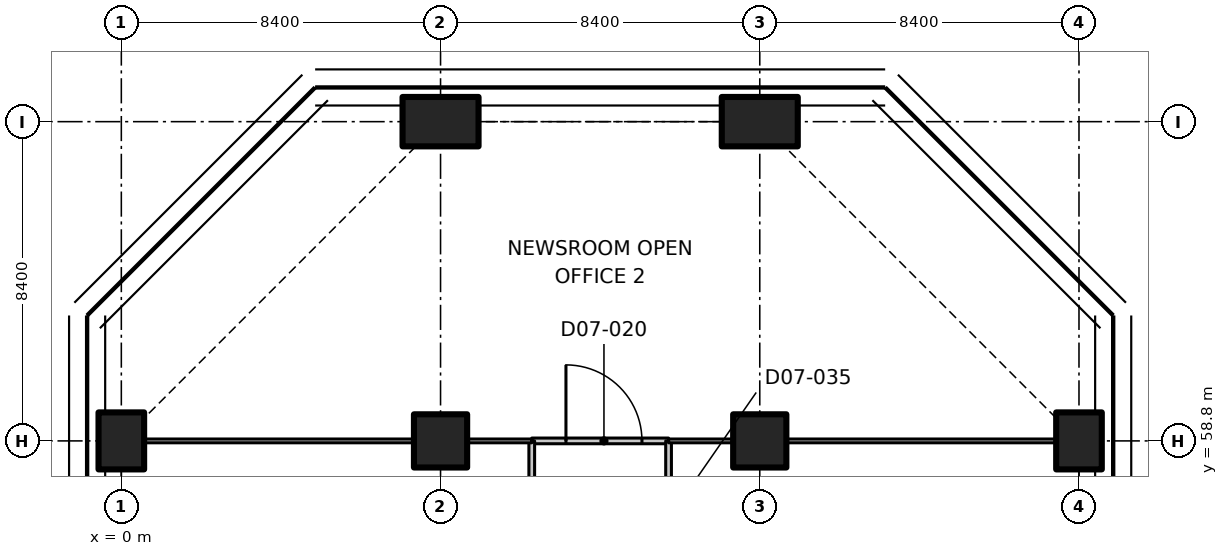
"""IFC4 building model, lengths in metres.
Left out: names, types, materials, properties, quantities, classifications, styles, units other than length and angle.
Written with IfcOpenShell. Run it as: python <this file> out.ifc"""

import sys

from ifc_helpers import new_model, si_unit, direction, frame, frame_2d, origin, origin_2d, place, context, subcontext, project, spatial, rectangle, extrude, element, fill, save


model = new_model("IFC4")
c1 = context("Model", 3, precision=1e-05, world=origin(), true_north=direction((0.0, 1.0)))
c2 = subcontext(c1, "Body", "Model", "MODEL_VIEW")
j1 = project(units=[si_unit("LENGTHUNIT", "METRE"), si_unit("PLANEANGLEUNIT", "RADIAN")], contexts=[c1])
p1 = place(None, origin())
s1 = spatial("IfcSite", under=j1, at=p1, CompositionType="ELEMENT")
p2 = place(p1, origin())
s2 = spatial("IfcBuilding", under=s1, at=p2, CompositionType="ELEMENT")
p3 = place(p2, frame((0.0, 0.0, 43.7)))
s3 = spatial("IfcBuildingStorey", under=s2, at=p3, CompositionType="ELEMENT", Elevation=43.7)
p4 = place(p3, frame((0.0, 58.8, 0.0), z_axis=(0.0, 0.0, 1.0), x_axis=(1.0, 0.0, 0.0)))
e1 = element("IfcColumn", 1, at=p4, inside=s3, PredefinedType="COLUMN", context=c2, shape_type="SweptSolid", body=[
    extrude(rectangle(XDim=1.2, YDim=1.5, at=origin_2d()), origin(), (0.0, 0.0, 1.0), 3.35),
])
p5 = place(p3, frame((8.4, 58.8, 0.0), z_axis=(0.0, 0.0, 1.0), x_axis=(1.0, 0.0, 0.0)))
e2 = element("IfcColumn", 2, at=p5, inside=s3, PredefinedType="COLUMN", context=c2, shape_type="SweptSolid", body=[
    extrude(rectangle(XDim=1.4, YDim=1.4, at=origin_2d()), origin(), (0.0, 0.0, 1.0), 3.35),
])
p6 = place(p3, frame((8.4, 67.2, 0.0), z_axis=(0.0, 0.0, 1.0), x_axis=(0.0, 1.0, 0.0)))
e3 = element("IfcColumn", 3, at=p6, inside=s3, PredefinedType="COLUMN", context=c2, shape_type="SweptSolid", body=[
    extrude(rectangle(XDim=1.3, YDim=2.0, at=origin_2d()), origin(), (0.0, 0.0, 1.0), 3.35),
])
p7 = place(p3, frame((16.8, 58.8, 0.0), z_axis=(0.0, 0.0, 1.0), x_axis=(1.0, 0.0, 0.0)))
e4 = element("IfcColumn", 4, at=p7, inside=s3, PredefinedType="COLUMN", context=c2, shape_type="SweptSolid", body=[
    extrude(rectangle(XDim=1.4, YDim=1.4, at=origin_2d()), origin(), (0.0, 0.0, 1.0), 3.35),
])
p8 = place(p3, frame((16.8, 67.2, 0.0), z_axis=(0.0, 0.0, 1.0), x_axis=(0.0, 1.0, 0.0)))
e5 = element("IfcColumn", 5, at=p8, inside=s3, PredefinedType="COLUMN", context=c2, shape_type="SweptSolid", body=[
    extrude(rectangle(XDim=1.3, YDim=2.0, at=origin_2d()), origin(), (0.0, 0.0, 1.0), 3.35),
])
p9 = place(p3, frame((25.2, 58.8, 0.0), z_axis=(0.0, 0.0, 1.0), x_axis=(1.0, 0.0, 0.0)))
e6 = element("IfcColumn", 6, at=p9, inside=s3, PredefinedType="COLUMN", context=c2, shape_type="SweptSolid", body=[
    extrude(rectangle(XDim=1.2, YDim=1.5, at=origin_2d()), origin(), (0.0, 0.0, 1.0), 3.35),
])
p10 = place(p3, frame((10.8, 58.8, 0.0), z_axis=(0.0, 0.0, 1.0), x_axis=(1.0, 0.0, 0.0)))
e7 = element("IfcWall", 7, at=p10, inside=s3, PredefinedType="PARTITIONING", context=c2, shape_type="SweptSolid", body=[
    extrude(rectangle(XDim=3.6, YDim=0.15, at=frame_2d((1.8, 0.0))), origin(), (0.0, 0.0, 1.0), 3.33),
])
p11 = place(p10, frame((0.9, 0.0, 0.0)))
e8 = element("IfcOpeningElement", 8, at=p11, cuts=e7, PredefinedType="OPENING", context=c2, shape_type="SweptSolid", body=[
    extrude(rectangle(XDim=2.0, YDim=2.4, at=frame_2d((1.0, 1.2))), frame((0.0, 0.085, 0.0), z_axis=(0.0, -1.0, 0.0), x_axis=(1.0, 0.0, 0.0)), (0.0, 0.0, 1.0), 0.17),
])
p12 = place(p3, frame((10.8, 54.6, 0.0), z_axis=(0.0, 0.0, 1.0), x_axis=(0.0, 1.0, 0.0)))
e9 = element("IfcWall", 9, at=p12, inside=s3, PredefinedType="PARTITIONING", context=c2, shape_type="SweptSolid", body=[
    extrude(rectangle(XDim=4.2, YDim=0.15, at=frame_2d((2.1, 0.0))), origin(), (0.0, 0.0, 1.0), 3.33),
])
p13 = place(p12, frame((1.5, 0.0, 0.0)))
e10 = element("IfcOpeningElement", 10, at=p13, cuts=e9, PredefinedType="OPENING", context=c2, shape_type="SweptSolid", body=[
    extrude(rectangle(XDim=1.1, YDim=2.1, at=frame_2d((0.55, 1.05))), frame((0.0, 0.085, 0.0), z_axis=(0.0, -1.0, 0.0), x_axis=(1.0, 0.0, 0.0)), (0.0, 0.0, 1.0), 0.17),
])
p14 = place(p3, frame((14.4, 58.8, 0.0), z_axis=(0.0, 0.0, 1.0), x_axis=(0.0, -1.0, 0.0)))
e11 = element("IfcWall", 11, at=p14, inside=s3, PredefinedType="PARTITIONING", context=c2, shape_type="SweptSolid", body=[
    extrude(rectangle(XDim=4.2, YDim=0.15, at=frame_2d((2.1, 0.0))), origin(), (0.0, 0.0, 1.0), 3.33),
])
p15 = place(p14, frame((1.5, 0.0, 0.0)))
e12 = element("IfcOpeningElement", 12, at=p15, cuts=e11, PredefinedType="OPENING", context=c2, shape_type="SweptSolid", body=[
    extrude(rectangle(XDim=1.1, YDim=2.1, at=frame_2d((0.55, 1.05))), frame((0.0, 0.085, 0.0), z_axis=(0.0, -1.0, 0.0), x_axis=(1.0, 0.0, 0.0)), (0.0, 0.0, 1.0), 0.17),
])
p16 = place(p3, frame((10.8, 58.8, 0.0), z_axis=(0.0, 0.0, 1.0), x_axis=(-1.0, 0.0, 0.0)))
e13 = element("IfcWall", 13, at=p16, inside=s3, PredefinedType="PARTITIONING", context=c2, shape_type="SweptSolid", body=[
    extrude(rectangle(XDim=1.68, YDim=0.1, at=frame_2d((0.84, 0.0))), origin(), (0.0, 0.0, 1.0), 3.33),
])
p17 = place(p3, frame((7.68, 58.8, 0.0), z_axis=(0.0, 0.0, 1.0), x_axis=(-1.0, 0.0, 0.0)))
e14 = element("IfcWall", 14, at=p17, inside=s3, PredefinedType="PARTITIONING", context=c2, shape_type="SweptSolid", body=[
    extrude(rectangle(XDim=7.06, YDim=0.1, at=frame_2d((3.53, 0.0))), origin(), (0.0, 0.0, 1.0), 3.33),
])
p18 = place(p3, frame((24.58, 58.8, 0.0), z_axis=(0.0, 0.0, 1.0), x_axis=(-1.0, 0.0, 0.0)))
e15 = element("IfcWall", 15, at=p18, inside=s3, PredefinedType="PARTITIONING", context=c2, shape_type="SweptSolid", body=[
    extrude(rectangle(XDim=7.06, YDim=0.1, at=frame_2d((3.53, 0.0))), origin(), (0.0, 0.0, 1.0), 3.33),
])
p19 = place(p3, frame((16.08, 58.8, 0.0), z_axis=(0.0, 0.0, 1.0), x_axis=(-1.0, 0.0, 0.0)))
e16 = element("IfcWall", 16, at=p19, inside=s3, PredefinedType="PARTITIONING", context=c2, shape_type="SweptSolid", body=[
    extrude(rectangle(XDim=1.68, YDim=0.1, at=frame_2d((0.84, 0.0))), origin(), (0.0, 0.0, 1.0), 3.33),
])
p20 = place(p11, origin())
e17 = element("IfcDoor", 17, at=p20, inside=s3, OperationType="DOUBLE_DOOR_SINGLE_SWING", PredefinedType="DOOR", context=c2, shape_type="SweptSolid", body=[
    extrude(rectangle(XDim=2.0, YDim=2.4, at=frame_2d((1.0, 1.2))), frame((0.0, 0.025, 0.0), z_axis=(0.0, -1.0, 0.0), x_axis=(1.0, 0.0, 0.0)), (0.0, 0.0, 1.0), 0.05),
])
fill(e8, e17)
save(model, sys.argv[1])
